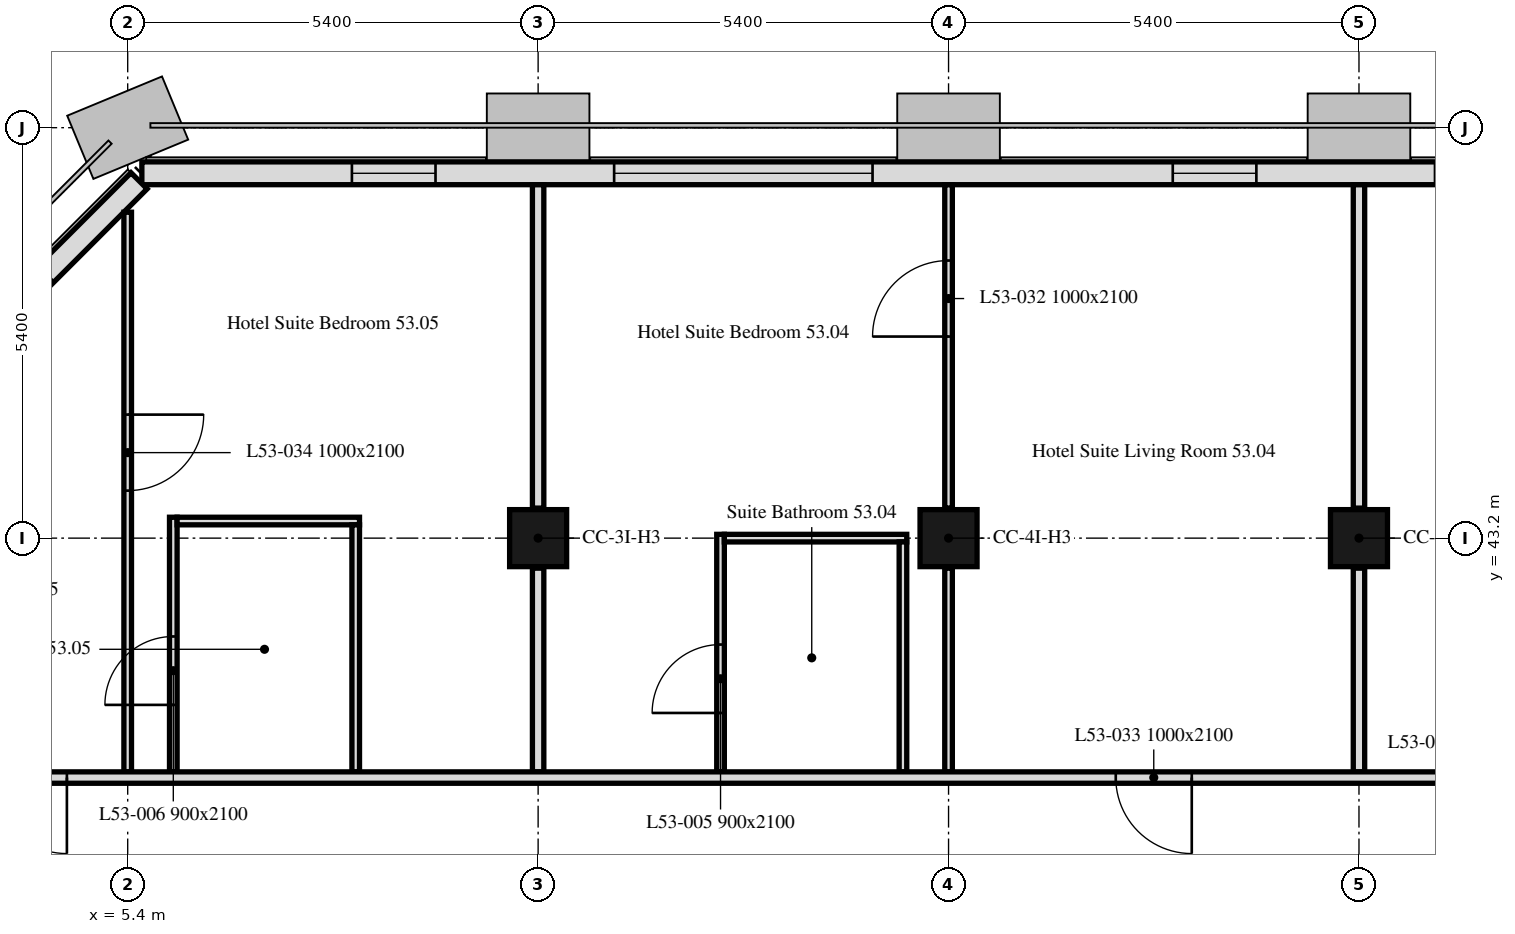
"""IFC4 building model, lengths in metres.
Left out: names, types, materials, properties, quantities, classifications, styles, units other than length and angle.
Written with IfcOpenShell. Run it as: python <this file> out.ifc"""

import sys

from ifc_helpers import new_model, si_unit, direction, frame, frame_2d, origin, origin_2d, place, context, subcontext, project, spatial, rectangle, extrude, element, fill, save


model = new_model("IFC4")
c1 = context("Model", 3, precision=1e-05, world=origin(), true_north=direction((0.0, 1.0)))
c2 = subcontext(c1, "Body", "Model", "MODEL_VIEW")
j1 = project(units=[si_unit("LENGTHUNIT", "METRE"), si_unit("PLANEANGLEUNIT", "RADIAN")], contexts=[c1])
p1 = place(None, origin())
s1 = spatial("IfcSite", under=j1, at=p1, CompositionType="ELEMENT")
p2 = place(p1, origin())
s2 = spatial("IfcBuilding", under=s1, at=p2, CompositionType="ELEMENT")
p3 = place(p2, frame((0.0, 0.0, 213.7)))
s3 = spatial("IfcBuildingStorey", under=s2, at=p3, CompositionType="ELEMENT", Elevation=213.7)
for number, where, z_axis, x_axis in (
    (1, (10.8, 43.2, 0.0), (0.0, 0.0, 1.0), (1.0, 0.0, 0.0)),
    (2, (16.2, 43.2, 0.0), (0.0, 0.0, 1.0), (1.0, 0.0, 0.0)),
    (3, (21.6, 43.2, 0.0), (0.0, 0.0, 1.0), (1.0, 0.0, 0.0)),
):
    element("IfcColumn", number, at=place(p3, frame(where, z_axis=z_axis, x_axis=x_axis)), inside=s3, PredefinedType="COLUMN", context=c2, shape_type="SweptSolid", body=[
        extrude(rectangle(XDim=0.75, YDim=0.75, at=origin_2d()), origin(), (0.0, 0.0, 1.0), 3.0),
    ])
p4 = place(p3, frame((37.614, 48.0, 0.0), z_axis=(0.0, 0.0, 1.0), x_axis=(-1.0, 0.0, 0.0)))
e4 = element("IfcWall", 4, at=p4, inside=s3, PredefinedType="SOLIDWALL", context=c2, shape_type="SweptSolid", body=[
    extrude(rectangle(XDim=32.027, YDim=0.3, at=frame_2d((16.014, 0.0))), origin(), (0.0, 0.0, 1.0), 3.0),
])
p5 = place(p4, frame((0.814, 0.0, 0.9)))
e5 = element("IfcOpeningElement", 5, at=p5, cuts=e4, PredefinedType="OPENING", context=c2, shape_type="SweptSolid", body=[
    extrude(rectangle(XDim=3.4, YDim=1.7, at=frame_2d((1.7, 0.85))), frame((0.0, 0.16, 0.0), z_axis=(0.0, -1.0, 0.0), x_axis=(1.0, 0.0, 0.0)), (0.0, 0.0, 1.0), 0.32),
])
p6 = place(p4, frame((6.564, 0.0, 0.9)))
e6 = element("IfcOpeningElement", 6, at=p6, cuts=e4, PredefinedType="OPENING", context=c2, shape_type="SweptSolid", body=[
    extrude(rectangle(XDim=1.1, YDim=1.7, at=frame_2d((0.55, 0.85))), frame((0.0, 0.16, 0.0), z_axis=(0.0, -1.0, 0.0), x_axis=(1.0, 0.0, 0.0)), (0.0, 0.0, 1.0), 0.32),
])
p7 = place(p4, frame((11.614, 0.0, 0.9)))
e7 = element("IfcOpeningElement", 7, at=p7, cuts=e4, PredefinedType="OPENING", context=c2, shape_type="SweptSolid", body=[
    extrude(rectangle(XDim=3.4, YDim=1.7, at=frame_2d((1.7, 0.85))), frame((0.0, 0.16, 0.0), z_axis=(0.0, -1.0, 0.0), x_axis=(1.0, 0.0, 0.0)), (0.0, 0.0, 1.0), 0.32),
])
p8 = place(p4, frame((17.364, 0.0, 0.9)))
e8 = element("IfcOpeningElement", 8, at=p8, cuts=e4, PredefinedType="OPENING", context=c2, shape_type="SweptSolid", body=[
    extrude(rectangle(XDim=1.1, YDim=1.7, at=frame_2d((0.55, 0.85))), frame((0.0, 0.16, 0.0), z_axis=(0.0, -1.0, 0.0), x_axis=(1.0, 0.0, 0.0)), (0.0, 0.0, 1.0), 0.32),
])
p9 = place(p4, frame((22.414, 0.0, 0.9)))
e9 = element("IfcOpeningElement", 9, at=p9, cuts=e4, PredefinedType="OPENING", context=c2, shape_type="SweptSolid", body=[
    extrude(rectangle(XDim=3.4, YDim=1.7, at=frame_2d((1.7, 0.85))), frame((0.0, 0.16, 0.0), z_axis=(0.0, -1.0, 0.0), x_axis=(1.0, 0.0, 0.0)), (0.0, 0.0, 1.0), 0.32),
])
p10 = place(p4, frame((28.164, 0.0, 0.9)))
e10 = element("IfcOpeningElement", 10, at=p10, cuts=e4, PredefinedType="OPENING", context=c2, shape_type="SweptSolid", body=[
    extrude(rectangle(XDim=1.1, YDim=1.7, at=frame_2d((0.55, 0.85))), frame((0.0, 0.16, 0.0), z_axis=(0.0, -1.0, 0.0), x_axis=(1.0, 0.0, 0.0)), (0.0, 0.0, 1.0), 0.32),
])
p11 = place(p3, frame((5.55, 47.901, 0.0), z_axis=(0.0, 0.0, 1.0), x_axis=(-0.707106781187, -0.707106781187, 0.0)))
e11 = element("IfcWall", 11, at=p11, inside=s3, PredefinedType="SOLIDWALL", context=c2, shape_type="SweptSolid", body=[
    extrude(rectangle(XDim=6.86, YDim=0.3, at=frame_2d((3.43, 0.0))), origin(), (0.0, 0.0, 1.0), 3.0),
])
p12 = place(p11, frame((1.73, 0.0, 0.9)))
e12 = element("IfcOpeningElement", 12, at=p12, cuts=e11, PredefinedType="OPENING", context=c2, shape_type="SweptSolid", body=[
    extrude(rectangle(XDim=3.4, YDim=1.7, at=frame_2d((1.7, 0.85))), frame((0.0, 0.16, 0.0), z_axis=(0.0, -1.0, 0.0), x_axis=(1.0, 0.0, 0.0)), (0.0, 0.0, 1.0), 0.32),
])
p13 = place(p3, frame((21.6, 47.849, 0.0), z_axis=(0.0, 0.0, 1.0), x_axis=(0.0, -1.0, 0.0)))
e13 = element("IfcWall", 13, at=p13, inside=s3, PredefinedType="PARTITIONING", context=c2, shape_type="SweptSolid", body=[
    extrude(rectangle(XDim=4.254, YDim=0.15, at=frame_2d((2.127, 0.0))), origin(), (0.0, 0.0, 1.0), 2.4),
])
p14 = place(p3, frame((21.6, 42.805, 0.0), z_axis=(0.0, 0.0, 1.0), x_axis=(0.0, -1.0, 0.0)))
e14 = element("IfcWall", 14, at=p14, inside=s3, PredefinedType="PARTITIONING", context=c2, shape_type="SweptSolid", body=[
    extrude(rectangle(XDim=2.68, YDim=0.15, at=frame_2d((1.34, 0.0))), origin(), (0.0, 0.0, 1.0), 2.4),
])
p15 = place(p3, frame((10.8, 47.849, 0.0), z_axis=(0.0, 0.0, 1.0), x_axis=(0.0, -1.0, 0.0)))
e15 = element("IfcWall", 15, at=p15, inside=s3, PredefinedType="PARTITIONING", context=c2, shape_type="SweptSolid", body=[
    extrude(rectangle(XDim=4.254, YDim=0.15, at=frame_2d((2.127, 0.0))), origin(), (0.0, 0.0, 1.0), 2.4),
])
p16 = place(p3, frame((10.8, 42.805, 0.0), z_axis=(0.0, 0.0, 1.0), x_axis=(0.0, -1.0, 0.0)))
e16 = element("IfcWall", 16, at=p16, inside=s3, PredefinedType="PARTITIONING", context=c2, shape_type="SweptSolid", body=[
    extrude(rectangle(XDim=2.68, YDim=0.15, at=frame_2d((1.34, 0.0))), origin(), (0.0, 0.0, 1.0), 2.4),
])
p17 = place(p3, frame((13.2, 40.125, 0.0), z_axis=(0.0, 0.0, 1.0), x_axis=(0.0, 1.0, 0.0)))
e17 = element("IfcWall", 17, at=p17, inside=s3, PredefinedType="PARTITIONING", context=c2, shape_type="SweptSolid", body=[
    extrude(rectangle(XDim=3.125, YDim=0.1, at=frame_2d((1.562, 0.0))), origin(), (0.0, 0.0, 1.0), 3.0),
])
p18 = place(p17, frame((0.775, 0.0, 0.0)))
e18 = element("IfcOpeningElement", 18, at=p18, cuts=e17, PredefinedType="OPENING", context=c2, shape_type="SweptSolid", body=[
    extrude(rectangle(XDim=0.9, YDim=2.1, at=frame_2d((0.45, 1.05))), frame((0.0, 0.05, 0.0), z_axis=(0.0, -1.0, 0.0), x_axis=(1.0, 0.0, 0.0)), (0.0, 0.0, 1.0), 0.1),
])
p19 = place(p3, frame((13.25, 43.2, 0.0), z_axis=(0.0, 0.0, 1.0), x_axis=(1.0, 0.0, 0.0)))
e19 = element("IfcWall", 19, at=p19, inside=s3, PredefinedType="PARTITIONING", context=c2, shape_type="SweptSolid", body=[
    extrude(rectangle(XDim=2.4, YDim=0.1, at=frame_2d((1.2, 0.0))), origin(), (0.0, 0.0, 1.0), 3.0),
])
p20 = place(p3, frame((15.6, 43.15, 0.0), z_axis=(0.0, 0.0, 1.0), x_axis=(0.0, -1.0, 0.0)))
e20 = element("IfcWall", 20, at=p20, inside=s3, PredefinedType="PARTITIONING", context=c2, shape_type="SweptSolid", body=[
    extrude(rectangle(XDim=3.025, YDim=0.1, at=frame_2d((1.512, 0.0))), origin(), (0.0, 0.0, 1.0), 3.0),
])
p21 = place(p3, frame((16.2, 40.125, 0.0), z_axis=(0.0, 0.0, 1.0), x_axis=(0.0, 1.0, 0.0)))
e21 = element("IfcWall", 21, at=p21, inside=s3, PredefinedType="PARTITIONING", context=c2, shape_type="SweptSolid", body=[
    extrude(rectangle(XDim=2.68, YDim=0.1, at=frame_2d((1.34, 0.0))), origin(), (0.0, 0.0, 1.0), 2.4),
])
p22 = place(p3, frame((16.2, 43.595, 0.0), z_axis=(0.0, 0.0, 1.0), x_axis=(0.0, 1.0, 0.0)))
e22 = element("IfcWall", 22, at=p22, inside=s3, PredefinedType="PARTITIONING", context=c2, shape_type="SweptSolid", body=[
    extrude(rectangle(XDim=4.254, YDim=0.1, at=frame_2d((2.127, 0.0))), origin(), (0.0, 0.0, 1.0), 2.4),
])
p23 = place(p22, frame((2.257, 0.0, 0.0)))
e23 = element("IfcOpeningElement", 23, at=p23, cuts=e22, PredefinedType="OPENING", context=c2, shape_type="SweptSolid", body=[
    extrude(rectangle(XDim=1.0, YDim=2.1, at=frame_2d((0.5, 1.05))), frame((0.0, 0.05, 0.0), z_axis=(0.0, -1.0, 0.0), x_axis=(1.0, 0.0, 0.0)), (0.0, 0.0, 1.0), 0.1),
])
p24 = place(p3, frame((5.4, 47.488, 0.0), z_axis=(0.0, 0.0, 1.0), x_axis=(0.0, -1.0, 0.0)))
e24 = element("IfcWall", 24, at=p24, inside=s3, PredefinedType="PARTITIONING", context=c2, shape_type="SweptSolid", body=[
    extrude(rectangle(XDim=7.363, YDim=0.1, at=frame_2d((3.681, 0.0))), origin(), (0.0, 0.0, 1.0), 3.0),
])
p25 = place(p24, frame((2.663, 0.0, 0.0)))
e25 = element("IfcOpeningElement", 25, at=p25, cuts=e24, PredefinedType="OPENING", context=c2, shape_type="SweptSolid", body=[
    extrude(rectangle(XDim=1.0, YDim=2.1, at=frame_2d((0.5, 1.05))), frame((0.0, 0.05, 0.0), z_axis=(0.0, -1.0, 0.0), x_axis=(1.0, 0.0, 0.0)), (0.0, 0.0, 1.0), 0.1),
])
p26 = place(p3, frame((6.0, 40.125, 0.0), z_axis=(0.0, 0.0, 1.0), x_axis=(0.0, 1.0, 0.0)))
e26 = element("IfcWall", 26, at=p26, inside=s3, PredefinedType="PARTITIONING", context=c2, shape_type="SweptSolid", body=[
    extrude(rectangle(XDim=3.35, YDim=0.1, at=frame_2d((1.675, 0.0))), origin(), (0.0, 0.0, 1.0), 3.0),
])
p27 = place(p26, frame((0.881, 0.0, 0.0)))
e27 = element("IfcOpeningElement", 27, at=p27, cuts=e26, PredefinedType="OPENING", context=c2, shape_type="SweptSolid", body=[
    extrude(rectangle(XDim=0.9, YDim=2.1, at=frame_2d((0.45, 1.05))), frame((0.0, 0.05, 0.0), z_axis=(0.0, -1.0, 0.0), x_axis=(1.0, 0.0, 0.0)), (0.0, 0.0, 1.0), 0.1),
])
p28 = place(p3, frame((6.05, 43.425, 0.0), z_axis=(0.0, 0.0, 1.0), x_axis=(1.0, 0.0, 0.0)))
e28 = element("IfcWall", 28, at=p28, inside=s3, PredefinedType="PARTITIONING", context=c2, shape_type="SweptSolid", body=[
    extrude(rectangle(XDim=2.4, YDim=0.1, at=frame_2d((1.2, 0.0))), origin(), (0.0, 0.0, 1.0), 3.0),
])
p29 = place(p3, frame((8.4, 43.375, 0.0), z_axis=(0.0, 0.0, 1.0), x_axis=(0.0, -1.0, 0.0)))
e29 = element("IfcWall", 29, at=p29, inside=s3, PredefinedType="PARTITIONING", context=c2, shape_type="SweptSolid", body=[
    extrude(rectangle(XDim=3.25, YDim=0.1, at=frame_2d((1.625, 0.0))), origin(), (0.0, 0.0, 1.0), 3.0),
])
p30 = place(p3, frame((42.449, 40.05, 0.0), z_axis=(0.0, 0.0, 1.0), x_axis=(-1.0, 0.0, 0.0)))
e30 = element("IfcWall", 30, at=p30, inside=s3, PredefinedType="PARTITIONING", context=c2, shape_type="SweptSolid", body=[
    extrude(rectangle(XDim=41.698, YDim=0.15, at=frame_2d((20.849, 0.0))), origin(), (0.0, 0.0, 1.0), 2.4),
])
p31 = place(p30, frame((2.249, 0.0, 0.0)))
e31 = element("IfcOpeningElement", 31, at=p31, cuts=e30, PredefinedType="OPENING", context=c2, shape_type="SweptSolid", body=[
    extrude(rectangle(XDim=1.0, YDim=2.1, at=frame_2d((0.5, 1.05))), frame((0.0, 0.075, 0.0), z_axis=(0.0, -1.0, 0.0), x_axis=(1.0, 0.0, 0.0)), (0.0, 0.0, 1.0), 0.15),
])
p32 = place(p30, frame((6.849, 0.0, 0.0)))
e32 = element("IfcOpeningElement", 32, at=p32, cuts=e30, PredefinedType="OPENING", context=c2, shape_type="SweptSolid", body=[
    extrude(rectangle(XDim=1.0, YDim=2.1, at=frame_2d((0.5, 1.05))), frame((0.0, 0.075, 0.0), z_axis=(0.0, -1.0, 0.0), x_axis=(1.0, 0.0, 0.0)), (0.0, 0.0, 1.0), 0.15),
])
p33 = place(p30, frame((18.449, 0.0, 0.0)))
e33 = element("IfcOpeningElement", 33, at=p33, cuts=e30, PredefinedType="OPENING", context=c2, shape_type="SweptSolid", body=[
    extrude(rectangle(XDim=1.0, YDim=2.1, at=frame_2d((0.5, 1.05))), frame((0.0, 0.075, 0.0), z_axis=(0.0, -1.0, 0.0), x_axis=(1.0, 0.0, 0.0)), (0.0, 0.0, 1.0), 0.15),
])
p34 = place(p30, frame((23.049, 0.0, 0.0)))
e34 = element("IfcOpeningElement", 34, at=p34, cuts=e30, PredefinedType="OPENING", context=c2, shape_type="SweptSolid", body=[
    extrude(rectangle(XDim=1.0, YDim=2.1, at=frame_2d((0.5, 1.05))), frame((0.0, 0.075, 0.0), z_axis=(0.0, -1.0, 0.0), x_axis=(1.0, 0.0, 0.0)), (0.0, 0.0, 1.0), 0.15),
])
p35 = place(p30, frame((37.849, 0.0, 0.0)))
e35 = element("IfcOpeningElement", 35, at=p35, cuts=e30, PredefinedType="OPENING", context=c2, shape_type="SweptSolid", body=[
    extrude(rectangle(XDim=1.0, YDim=2.1, at=frame_2d((0.5, 1.05))), frame((0.0, 0.075, 0.0), z_axis=(0.0, -1.0, 0.0), x_axis=(1.0, 0.0, 0.0)), (0.0, 0.0, 1.0), 0.15),
])
p36 = place(p8, origin())
e36 = element("IfcWindow", 36, at=p36, inside=s3, PartitioningType="SINGLE_PANEL", PredefinedType="WINDOW", context=c2, shape_type="SweptSolid", body=[
    extrude(rectangle(XDim=1.1, YDim=1.7, at=frame_2d((0.55, 0.85))), frame((0.0, 0.03, 0.0), z_axis=(0.0, -1.0, 0.0), x_axis=(1.0, 0.0, 0.0)), (0.0, 0.0, 1.0), 0.06),
])
fill(e8, e36)
p37 = place(p9, origin())
e37 = element("IfcWindow", 37, at=p37, inside=s3, PartitioningType="SINGLE_PANEL", PredefinedType="WINDOW", context=c2, shape_type="SweptSolid", body=[
    extrude(rectangle(XDim=3.4, YDim=1.7, at=frame_2d((1.7, 0.85))), frame((0.0, 0.03, 0.0), z_axis=(0.0, -1.0, 0.0), x_axis=(1.0, 0.0, 0.0)), (0.0, 0.0, 1.0), 0.06),
])
fill(e9, e37)
p38 = place(p10, origin())
e38 = element("IfcWindow", 38, at=p38, inside=s3, PartitioningType="SINGLE_PANEL", PredefinedType="WINDOW", context=c2, shape_type="SweptSolid", body=[
    extrude(rectangle(XDim=1.1, YDim=1.7, at=frame_2d((0.55, 0.85))), frame((0.0, 0.03, 0.0), z_axis=(0.0, -1.0, 0.0), x_axis=(1.0, 0.0, 0.0)), (0.0, 0.0, 1.0), 0.06),
])
fill(e10, e38)
p39 = place(p18, origin())
e39 = element("IfcDoor", 39, at=p39, inside=s3, OperationType="SINGLE_SWING_LEFT", PredefinedType="DOOR", context=c2, shape_type="SweptSolid", body=[
    extrude(rectangle(XDim=0.9, YDim=2.1, at=frame_2d((0.45, 1.05))), frame((0.0, 0.025, 0.0), z_axis=(0.0, -1.0, 0.0), x_axis=(1.0, 0.0, 0.0)), (0.0, 0.0, 1.0), 0.05),
])
fill(e18, e39)
p40 = place(p27, origin())
e40 = element("IfcDoor", 40, at=p40, inside=s3, OperationType="SINGLE_SWING_RIGHT", PredefinedType="DOOR", context=c2, shape_type="SweptSolid", body=[
    extrude(rectangle(XDim=0.9, YDim=2.1, at=frame_2d((0.45, 1.05))), frame((0.0, 0.025, 0.0), z_axis=(0.0, -1.0, 0.0), x_axis=(1.0, 0.0, 0.0)), (0.0, 0.0, 1.0), 0.05),
])
fill(e27, e40)
p41 = place(p23, origin())
e41 = element("IfcDoor", 41, at=p41, inside=s3, OperationType="SINGLE_SWING_LEFT", PredefinedType="DOOR", context=c2, shape_type="SweptSolid", body=[
    extrude(rectangle(XDim=1.0, YDim=2.1, at=frame_2d((0.5, 1.05))), frame((0.0, 0.025, 0.0), z_axis=(0.0, -1.0, 0.0), x_axis=(1.0, 0.0, 0.0)), (0.0, 0.0, 1.0), 0.05),
])
fill(e23, e41)
p42 = place(p34, origin())
e42 = element("IfcDoor", 42, at=p42, inside=s3, OperationType="SINGLE_SWING_LEFT", PredefinedType="DOOR", context=c2, shape_type="SweptSolid", body=[
    extrude(rectangle(XDim=1.0, YDim=2.1, at=frame_2d((0.5, 1.05))), frame((0.0, 0.025, 0.0), z_axis=(0.0, -1.0, 0.0), x_axis=(1.0, 0.0, 0.0)), (0.0, 0.0, 1.0), 0.05),
])
fill(e34, e42)
p43 = place(p25, origin())
e43 = element("IfcDoor", 43, at=p43, inside=s3, OperationType="SINGLE_SWING_RIGHT", PredefinedType="DOOR", context=c2, shape_type="SweptSolid", body=[
    extrude(rectangle(XDim=1.0, YDim=2.1, at=frame_2d((0.5, 1.05))), frame((0.0, 0.025, 0.0), z_axis=(0.0, -1.0, 0.0), x_axis=(1.0, 0.0, 0.0)), (0.0, 0.0, 1.0), 0.05),
])
fill(e25, e43)
p44 = place(p35, origin())
e44 = element("IfcDoor", 44, at=p44, inside=s3, OperationType="SINGLE_SWING_LEFT", PredefinedType="DOOR", context=c2, shape_type="SweptSolid", body=[
    extrude(rectangle(XDim=1.0, YDim=2.1, at=frame_2d((0.5, 1.05))), frame((0.0, 0.025, 0.0), z_axis=(0.0, -1.0, 0.0), x_axis=(1.0, 0.0, 0.0)), (0.0, 0.0, 1.0), 0.05),
])
fill(e35, e44)
save(model, sys.argv[1])
